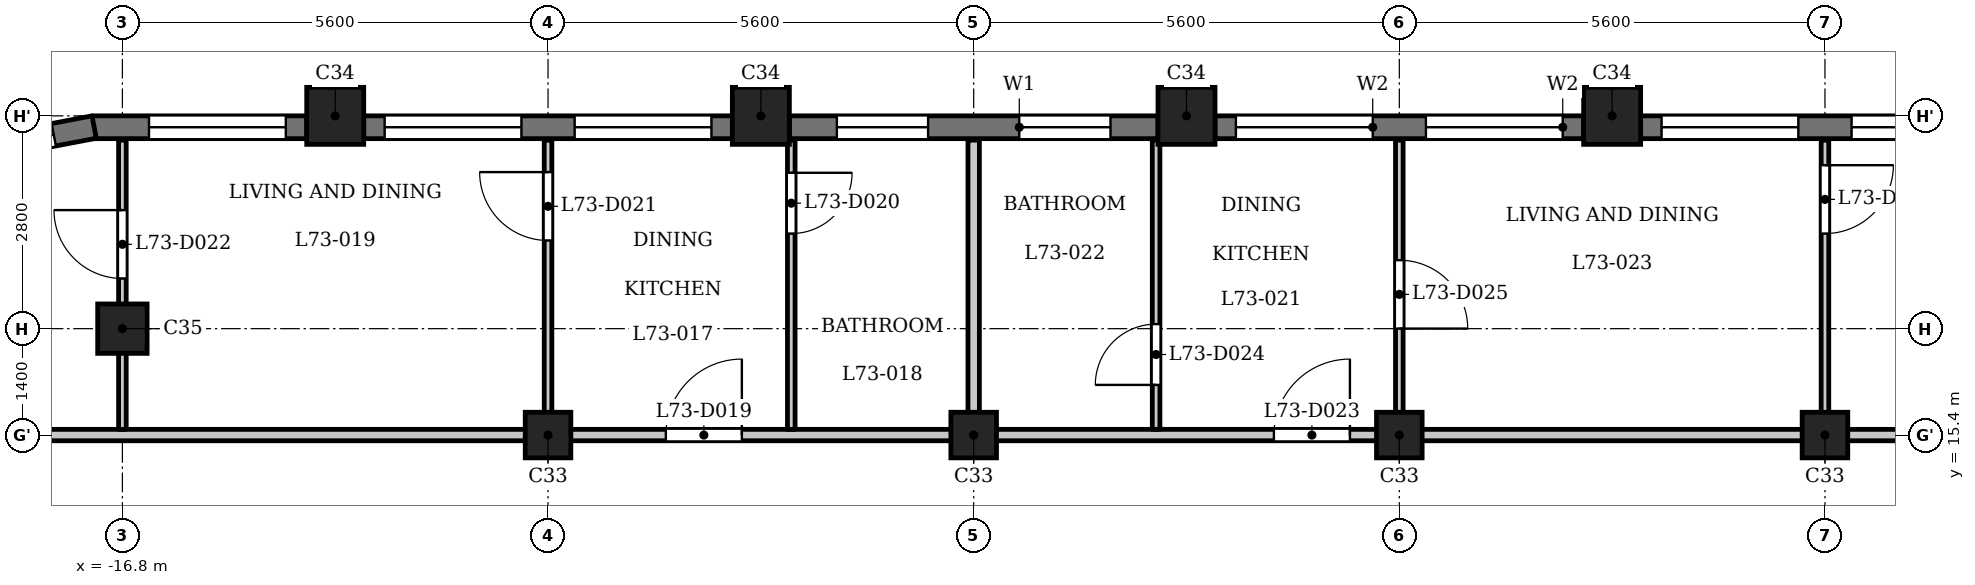
"""IFC4 building model, lengths in metres.
Left out: names, types, materials, properties, quantities, classifications, styles, units other than length and angle.
Written with IfcOpenShell. Run it as: python <this file> out.ifc"""

import sys

from ifc_helpers import new_model, si_unit, direction, frame, frame_2d, origin, origin_2d, place, context, subcontext, project, spatial, rectangle, extrude, element, fill, save


model = new_model("IFC4")
c1 = context("Model", 3, precision=1e-05, world=origin(), true_north=direction((0.0, 1.0)))
c2 = subcontext(c1, "Body", "Model", "MODEL_VIEW")
j1 = project(units=[si_unit("LENGTHUNIT", "METRE"), si_unit("PLANEANGLEUNIT", "RADIAN")], contexts=[c1])
p1 = place(None, origin())
s1 = spatial("IfcSite", under=j1, at=p1, CompositionType="ELEMENT")
p2 = place(p1, origin())
s2 = spatial("IfcBuilding", under=s1, at=p2, CompositionType="ELEMENT")
p3 = place(p2, frame((0.0, 0.0, 280.2)))
s3 = spatial("IfcBuildingStorey", under=s2, at=p3, CompositionType="ELEMENT", Elevation=280.2)
for number, where, z_axis, x_axis in (
    (1, (2.8, 19.6, 0.0), (0.0, 0.0, 1.0), (1.0, 0.0, 0.0)),
    (2, (-2.8, 19.6, 0.0), (0.0, 0.0, 1.0), (1.0, 0.0, 0.0)),
    (3, (-8.4, 19.6, 0.0), (0.0, 0.0, 1.0), (1.0, 0.0, 0.0)),
    (4, (-14.0, 19.6, 0.0), (0.0, 0.0, 1.0), (1.0, 0.0, 0.0)),
):
    element("IfcColumn", number, at=place(p3, frame(where, z_axis=z_axis, x_axis=x_axis)), inside=s3, PredefinedType="COLUMN", context=c2, shape_type="SweptSolid", body=[
        extrude(rectangle(XDim=0.75, YDim=0.75, at=origin_2d()), origin(), (0.0, 0.0, 1.0), 3.5),
    ])
p4 = place(p3, frame((-16.8, 16.8, 0.0), z_axis=(0.0, 0.0, 1.0), x_axis=(1.0, 0.0, 0.0)))
e5 = element("IfcColumn", 5, at=p4, inside=s3, PredefinedType="COLUMN", context=c2, shape_type="SweptSolid", body=[
    extrude(rectangle(XDim=0.65, YDim=0.65, at=origin_2d()), origin(), (0.0, 0.0, 1.0), 3.5),
])
for number, where, z_axis, x_axis in (
    (6, (-11.2, 15.4, 0.0), (0.0, 0.0, 1.0), (1.0, 0.0, 0.0)),
    (7, (-5.6, 15.4, 0.0), (0.0, 0.0, 1.0), (1.0, 0.0, 0.0)),
    (8, (0.0, 15.4, 0.0), (0.0, 0.0, 1.0), (1.0, 0.0, 0.0)),
    (9, (5.6, 15.4, 0.0), (0.0, 0.0, 1.0), (1.0, 0.0, 0.0)),
):
    element("IfcColumn", number, at=place(p3, frame(where, z_axis=z_axis, x_axis=x_axis)), inside=s3, PredefinedType="COLUMN", context=c2, shape_type="SweptSolid", body=[
        extrude(rectangle(XDim=0.6, YDim=0.6, at=origin_2d()), origin(), (0.0, 0.0, 1.0), 3.5),
    ])
p5 = place(p3, frame((8.025, 19.45, 0.0), z_axis=(0.0, 0.0, 1.0), x_axis=(-1.0, 0.0, 0.0)))
e10 = element("IfcWall", 10, at=p5, inside=s3, PredefinedType="SOLIDWALL", context=c2, shape_type="SweptSolid", body=[
    extrude(rectangle(XDim=4.85, YDim=0.3, at=frame_2d((2.425, 0.0))), origin(), (0.0, 0.0, 1.0), 2.5),
])
p6 = place(p5, frame((0.275, 0.0, 0.9)))
e11 = element("IfcOpeningElement", 11, at=p6, cuts=e10, PredefinedType="OPENING", context=c2, shape_type="SweptSolid", body=[
    extrude(rectangle(XDim=1.8, YDim=1.25, at=frame_2d((0.9, 0.625))), frame((0.0, 0.16, 0.0), z_axis=(0.0, -1.0, 0.0), x_axis=(1.0, 0.0, 0.0)), (0.0, 0.0, 1.0), 0.32),
])
p7 = place(p5, frame((2.775, 0.0, 0.9)))
e12 = element("IfcOpeningElement", 12, at=p7, cuts=e10, PredefinedType="OPENING", context=c2, shape_type="SweptSolid", body=[
    extrude(rectangle(XDim=1.8, YDim=1.25, at=frame_2d((0.9, 0.625))), frame((0.0, 0.16, 0.0), z_axis=(0.0, -1.0, 0.0), x_axis=(1.0, 0.0, 0.0)), (0.0, 0.0, 1.0), 0.32),
])
p8 = place(p3, frame((2.425, 19.45, 0.0), z_axis=(0.0, 0.0, 1.0), x_axis=(-1.0, 0.0, 0.0)))
e13 = element("IfcWall", 13, at=p8, inside=s3, PredefinedType="SOLIDWALL", context=c2, shape_type="SweptSolid", body=[
    extrude(rectangle(XDim=4.85, YDim=0.3, at=frame_2d((2.425, 0.0))), origin(), (0.0, 0.0, 1.0), 2.5),
])
p9 = place(p8, frame((0.275, 0.0, 0.9)))
e14 = element("IfcOpeningElement", 14, at=p9, cuts=e13, PredefinedType="OPENING", context=c2, shape_type="SweptSolid", body=[
    extrude(rectangle(XDim=1.8, YDim=1.25, at=frame_2d((0.9, 0.625))), frame((0.0, 0.16, 0.0), z_axis=(0.0, -1.0, 0.0), x_axis=(1.0, 0.0, 0.0)), (0.0, 0.0, 1.0), 0.32),
])
p10 = place(p8, frame((2.775, 0.0, 0.9)))
e15 = element("IfcOpeningElement", 15, at=p10, cuts=e13, PredefinedType="OPENING", context=c2, shape_type="SweptSolid", body=[
    extrude(rectangle(XDim=1.8, YDim=1.25, at=frame_2d((0.9, 0.625))), frame((0.0, 0.16, 0.0), z_axis=(0.0, -1.0, 0.0), x_axis=(1.0, 0.0, 0.0)), (0.0, 0.0, 1.0), 0.32),
])
p11 = place(p3, frame((-3.175, 19.45, 0.0), z_axis=(0.0, 0.0, 1.0), x_axis=(-1.0, 0.0, 0.0)))
e16 = element("IfcWall", 16, at=p11, inside=s3, PredefinedType="SOLIDWALL", context=c2, shape_type="SweptSolid", body=[
    extrude(rectangle(XDim=4.85, YDim=0.3, at=frame_2d((2.425, 0.0))), origin(), (0.0, 0.0, 1.0), 2.5),
])
p12 = place(p11, frame((0.625, 0.0, 0.6)))
e17 = element("IfcOpeningElement", 17, at=p12, cuts=e16, PredefinedType="OPENING", context=c2, shape_type="SweptSolid", body=[
    extrude(rectangle(XDim=1.2, YDim=1.55, at=frame_2d((0.6, 0.775))), frame((0.0, 0.16, 0.0), z_axis=(0.0, -1.0, 0.0), x_axis=(1.0, 0.0, 0.0)), (0.0, 0.0, 1.0), 0.32),
])
p13 = place(p11, frame((3.025, 0.0, 0.6)))
e18 = element("IfcOpeningElement", 18, at=p13, cuts=e16, PredefinedType="OPENING", context=c2, shape_type="SweptSolid", body=[
    extrude(rectangle(XDim=1.2, YDim=1.55, at=frame_2d((0.6, 0.775))), frame((0.0, 0.16, 0.0), z_axis=(0.0, -1.0, 0.0), x_axis=(1.0, 0.0, 0.0)), (0.0, 0.0, 1.0), 0.32),
])
p14 = place(p3, frame((-8.775, 19.45, 0.0), z_axis=(0.0, 0.0, 1.0), x_axis=(-1.0, 0.0, 0.0)))
e19 = element("IfcWall", 19, at=p14, inside=s3, PredefinedType="SOLIDWALL", context=c2, shape_type="SweptSolid", body=[
    extrude(rectangle(XDim=4.85, YDim=0.3, at=frame_2d((2.425, 0.0))), origin(), (0.0, 0.0, 1.0), 2.5),
])
p15 = place(p14, frame((0.275, 0.0, 0.9)))
e20 = element("IfcOpeningElement", 20, at=p15, cuts=e19, PredefinedType="OPENING", context=c2, shape_type="SweptSolid", body=[
    extrude(rectangle(XDim=1.8, YDim=1.25, at=frame_2d((0.9, 0.625))), frame((0.0, 0.16, 0.0), z_axis=(0.0, -1.0, 0.0), x_axis=(1.0, 0.0, 0.0)), (0.0, 0.0, 1.0), 0.32),
])
p16 = place(p14, frame((2.775, 0.0, 0.9)))
e21 = element("IfcOpeningElement", 21, at=p16, cuts=e19, PredefinedType="OPENING", context=c2, shape_type="SweptSolid", body=[
    extrude(rectangle(XDim=1.8, YDim=1.25, at=frame_2d((0.9, 0.625))), frame((0.0, 0.16, 0.0), z_axis=(0.0, -1.0, 0.0), x_axis=(1.0, 0.0, 0.0)), (0.0, 0.0, 1.0), 0.32),
])
p17 = place(p3, frame((-14.375, 19.45, 0.0), z_axis=(0.0, 0.0, 1.0), x_axis=(-1.0, 0.0, 0.0)))
e22 = element("IfcWall", 22, at=p17, inside=s3, PredefinedType="SOLIDWALL", context=c2, shape_type="SweptSolid", body=[
    extrude(rectangle(XDim=2.825, YDim=0.3, at=frame_2d((1.413, 0.0))), origin(), (0.0, 0.0, 1.0), 2.5),
])
p18 = place(p17, frame((0.275, 0.0, 0.9)))
e23 = element("IfcOpeningElement", 23, at=p18, cuts=e22, PredefinedType="OPENING", context=c2, shape_type="SweptSolid", body=[
    extrude(rectangle(XDim=1.8, YDim=1.25, at=frame_2d((0.9, 0.625))), frame((0.0, 0.16, 0.0), z_axis=(0.0, -1.0, 0.0), x_axis=(1.0, 0.0, 0.0)), (0.0, 0.0, 1.0), 0.32),
])
p19 = place(p3, frame((-17.172, 19.453, 0.0), z_axis=(0.0, 0.0, 1.0), x_axis=(-0.982284001233, -0.187398348234, 0.0)))
e24 = element("IfcWall", 24, at=p19, inside=s3, PredefinedType="SOLIDWALL", context=c2, shape_type="SweptSolid", body=[
    extrude(rectangle(XDim=1.881, YDim=0.3, at=frame_2d((0.941, 0.0))), origin(), (0.0, 0.0, 1.0), 2.5),
])
p20 = place(p19, frame((0.541, 0.0, 0.6)))
e25 = element("IfcOpeningElement", 25, at=p20, cuts=e24, PredefinedType="OPENING", context=c2, shape_type="SweptSolid", body=[
    extrude(rectangle(XDim=0.8, YDim=1.55, at=frame_2d((0.4, 0.775))), frame((0.0, 0.16, 0.0), z_axis=(0.0, -1.0, 0.0), x_axis=(1.0, 0.0, 0.0)), (0.0, 0.0, 1.0), 0.32),
])
p21 = place(p3, frame((-23.55, 15.4, 0.0), z_axis=(0.0, 0.0, 1.0), x_axis=(1.0, 0.0, 0.0)))
e26 = element("IfcWall", 26, at=p21, inside=s3, PredefinedType="PARTITIONING", context=c2, shape_type="SweptSolid", body=[
    extrude(rectangle(XDim=46.872, YDim=0.15, at=frame_2d((23.436, 0.0))), origin(), (0.0, 0.0, 1.0), 3.15),
])
p22 = place(p21, frame((13.9, 0.0, 0.0)))
e27 = element("IfcOpeningElement", 27, at=p22, cuts=e26, PredefinedType="OPENING", context=c2, shape_type="SweptSolid", body=[
    extrude(rectangle(XDim=1.0, YDim=2.1, at=frame_2d((0.5, 1.05))), frame((0.0, 0.085, 0.0), z_axis=(0.0, -1.0, 0.0), x_axis=(1.0, 0.0, 0.0)), (0.0, 0.0, 1.0), 0.17),
])
p23 = place(p21, frame((21.9, 0.0, 0.0)))
e28 = element("IfcOpeningElement", 28, at=p23, cuts=e26, PredefinedType="OPENING", context=c2, shape_type="SweptSolid", body=[
    extrude(rectangle(XDim=1.0, YDim=2.1, at=frame_2d((0.5, 1.05))), frame((0.0, 0.085, 0.0), z_axis=(0.0, -1.0, 0.0), x_axis=(1.0, 0.0, 0.0)), (0.0, 0.0, 1.0), 0.17),
])
p24 = place(p21, frame((38.7, 0.0, 0.0)))
e29 = element("IfcOpeningElement", 29, at=p24, cuts=e26, PredefinedType="OPENING", context=c2, shape_type="SweptSolid", body=[
    extrude(rectangle(XDim=1.0, YDim=2.1, at=frame_2d((0.5, 1.05))), frame((0.0, 0.085, 0.0), z_axis=(0.0, -1.0, 0.0), x_axis=(1.0, 0.0, 0.0)), (0.0, 0.0, 1.0), 0.17),
])
p25 = place(p3, frame((-16.8, 15.475, 0.0), z_axis=(0.0, 0.0, 1.0), x_axis=(0.0, 1.0, 0.0)))
e30 = element("IfcWall", 30, at=p25, inside=s3, PredefinedType="PARTITIONING", context=c2, shape_type="SweptSolid", body=[
    extrude(rectangle(XDim=3.805, YDim=0.1, at=frame_2d((1.902, 0.0))), origin(), (0.0, 0.0, 1.0), 3.15),
])
p26 = place(p25, frame((1.985, 0.0, 0.0)))
e31 = element("IfcOpeningElement", 31, at=p26, cuts=e30, PredefinedType="OPENING", context=c2, shape_type="SweptSolid", body=[
    extrude(rectangle(XDim=0.9, YDim=2.1, at=frame_2d((0.45, 1.05))), frame((0.0, 0.06, 0.0), z_axis=(0.0, -1.0, 0.0), x_axis=(1.0, 0.0, 0.0)), (0.0, 0.0, 1.0), 0.12),
])
p27 = place(p3, frame((-11.2, 15.475, 0.0), z_axis=(0.0, 0.0, 1.0), x_axis=(0.0, 1.0, 0.0)))
e32 = element("IfcWall", 32, at=p27, inside=s3, PredefinedType="PARTITIONING", context=c2, shape_type="SweptSolid", body=[
    extrude(rectangle(XDim=3.805, YDim=0.1, at=frame_2d((1.902, 0.0))), origin(), (0.0, 0.0, 1.0), 3.15),
])
p28 = place(p27, frame((2.485, 0.0, 0.0)))
e33 = element("IfcOpeningElement", 33, at=p28, cuts=e32, PredefinedType="OPENING", context=c2, shape_type="SweptSolid", body=[
    extrude(rectangle(XDim=0.9, YDim=2.1, at=frame_2d((0.45, 1.05))), frame((0.0, 0.06, 0.0), z_axis=(0.0, -1.0, 0.0), x_axis=(1.0, 0.0, 0.0)), (0.0, 0.0, 1.0), 0.12),
])
p29 = place(p3, frame((-8.0, 15.475, 0.0), z_axis=(0.0, 0.0, 1.0), x_axis=(0.0, 1.0, 0.0)))
e34 = element("IfcWall", 34, at=p29, inside=s3, PredefinedType="PARTITIONING", context=c2, shape_type="SweptSolid", body=[
    extrude(rectangle(XDim=3.805, YDim=0.1, at=frame_2d((1.902, 0.0))), origin(), (0.0, 0.0, 1.0), 3.15),
])
p30 = place(p29, frame((2.576, 0.0, 0.0)))
e35 = element("IfcOpeningElement", 35, at=p30, cuts=e34, PredefinedType="OPENING", context=c2, shape_type="SweptSolid", body=[
    extrude(rectangle(XDim=0.8, YDim=2.1, at=frame_2d((0.4, 1.05))), frame((0.0, 0.06, 0.0), z_axis=(0.0, -1.0, 0.0), x_axis=(1.0, 0.0, 0.0)), (0.0, 0.0, 1.0), 0.12),
])
p31 = place(p3, frame((-5.6, 15.475, 0.0), z_axis=(0.0, 0.0, 1.0), x_axis=(0.0, 1.0, 0.0)))
e36 = element("IfcWall", 36, at=p31, inside=s3, PredefinedType="PARTITIONING", context=c2, shape_type="SweptSolid", body=[
    extrude(rectangle(XDim=3.805, YDim=0.15, at=frame_2d((1.902, 0.0))), origin(), (0.0, 0.0, 1.0), 3.15),
])
p32 = place(p3, frame((-3.2, 15.475, 0.0), z_axis=(0.0, 0.0, 1.0), x_axis=(0.0, 1.0, 0.0)))
e37 = element("IfcWall", 37, at=p32, inside=s3, PredefinedType="PARTITIONING", context=c2, shape_type="SweptSolid", body=[
    extrude(rectangle(XDim=3.805, YDim=0.1, at=frame_2d((1.902, 0.0))), origin(), (0.0, 0.0, 1.0), 3.15),
])
p33 = place(p32, frame((0.585, 0.0, 0.0)))
e38 = element("IfcOpeningElement", 38, at=p33, cuts=e37, PredefinedType="OPENING", context=c2, shape_type="SweptSolid", body=[
    extrude(rectangle(XDim=0.8, YDim=2.1, at=frame_2d((0.4, 1.05))), frame((0.0, 0.06, 0.0), z_axis=(0.0, -1.0, 0.0), x_axis=(1.0, 0.0, 0.0)), (0.0, 0.0, 1.0), 0.12),
])
p34 = place(p3, frame((0.0, 15.475, 0.0), z_axis=(0.0, 0.0, 1.0), x_axis=(0.0, 1.0, 0.0)))
e39 = element("IfcWall", 39, at=p34, inside=s3, PredefinedType="PARTITIONING", context=c2, shape_type="SweptSolid", body=[
    extrude(rectangle(XDim=3.805, YDim=0.1, at=frame_2d((1.902, 0.0))), origin(), (0.0, 0.0, 1.0), 3.15),
])
p35 = place(p34, frame((1.326, 0.0, 0.0)))
e40 = element("IfcOpeningElement", 40, at=p35, cuts=e39, PredefinedType="OPENING", context=c2, shape_type="SweptSolid", body=[
    extrude(rectangle(XDim=0.9, YDim=2.1, at=frame_2d((0.45, 1.05))), frame((0.0, 0.06, 0.0), z_axis=(0.0, -1.0, 0.0), x_axis=(1.0, 0.0, 0.0)), (0.0, 0.0, 1.0), 0.12),
])
p36 = place(p3, frame((5.6, 15.475, 0.0), z_axis=(0.0, 0.0, 1.0), x_axis=(0.0, 1.0, 0.0)))
e41 = element("IfcWall", 41, at=p36, inside=s3, PredefinedType="PARTITIONING", context=c2, shape_type="SweptSolid", body=[
    extrude(rectangle(XDim=3.805, YDim=0.1, at=frame_2d((1.902, 0.0))), origin(), (0.0, 0.0, 1.0), 3.15),
])
p37 = place(p36, frame((2.576, 0.0, 0.0)))
e42 = element("IfcOpeningElement", 42, at=p37, cuts=e41, PredefinedType="OPENING", context=c2, shape_type="SweptSolid", body=[
    extrude(rectangle(XDim=0.9, YDim=2.1, at=frame_2d((0.45, 1.05))), frame((0.0, 0.06, 0.0), z_axis=(0.0, -1.0, 0.0), x_axis=(1.0, 0.0, 0.0)), (0.0, 0.0, 1.0), 0.12),
])
p38 = place(p22, origin())
e43 = element("IfcDoor", 43, at=p38, inside=s3, OperationType="SINGLE_SWING_LEFT", PredefinedType="DOOR", context=c2, shape_type="SweptSolid", body=[
    extrude(rectangle(XDim=1.0, YDim=2.1, at=frame_2d((0.5, 1.05))), frame((0.0, 0.025, 0.0), z_axis=(0.0, -1.0, 0.0), x_axis=(1.0, 0.0, 0.0)), (0.0, 0.0, 1.0), 0.05),
])
fill(e27, e43)
p39 = place(p30, origin())
e44 = element("IfcDoor", 44, at=p39, inside=s3, OperationType="SINGLE_SWING_RIGHT", PredefinedType="DOOR", context=c2, shape_type="SweptSolid", body=[
    extrude(rectangle(XDim=0.8, YDim=2.1, at=frame_2d((0.4, 1.05))), frame((0.0, 0.025, 0.0), z_axis=(0.0, -1.0, 0.0), x_axis=(1.0, 0.0, 0.0)), (0.0, 0.0, 1.0), 0.05),
])
fill(e35, e44)
p40 = place(p28, origin())
e45 = element("IfcDoor", 45, at=p40, inside=s3, OperationType="SINGLE_SWING_LEFT", PredefinedType="DOOR", context=c2, shape_type="SweptSolid", body=[
    extrude(rectangle(XDim=0.9, YDim=2.1, at=frame_2d((0.45, 1.05))), frame((0.0, 0.025, 0.0), z_axis=(0.0, -1.0, 0.0), x_axis=(1.0, 0.0, 0.0)), (0.0, 0.0, 1.0), 0.05),
])
fill(e33, e45)
p41 = place(p26, origin())
e46 = element("IfcDoor", 46, at=p41, inside=s3, OperationType="SINGLE_SWING_LEFT", PredefinedType="DOOR", context=c2, shape_type="SweptSolid", body=[
    extrude(rectangle(XDim=0.9, YDim=2.1, at=frame_2d((0.45, 1.05))), frame((0.0, 0.025, 0.0), z_axis=(0.0, -1.0, 0.0), x_axis=(1.0, 0.0, 0.0)), (0.0, 0.0, 1.0), 0.05),
])
fill(e31, e46)
p42 = place(p23, origin())
e47 = element("IfcDoor", 47, at=p42, inside=s3, OperationType="SINGLE_SWING_LEFT", PredefinedType="DOOR", context=c2, shape_type="SweptSolid", body=[
    extrude(rectangle(XDim=1.0, YDim=2.1, at=frame_2d((0.5, 1.05))), frame((0.0, 0.025, 0.0), z_axis=(0.0, -1.0, 0.0), x_axis=(1.0, 0.0, 0.0)), (0.0, 0.0, 1.0), 0.05),
])
fill(e28, e47)
p43 = place(p33, origin())
e48 = element("IfcDoor", 48, at=p43, inside=s3, OperationType="SINGLE_SWING_RIGHT", PredefinedType="DOOR", context=c2, shape_type="SweptSolid", body=[
    extrude(rectangle(XDim=0.8, YDim=2.1, at=frame_2d((0.4, 1.05))), frame((0.0, 0.025, 0.0), z_axis=(0.0, -1.0, 0.0), x_axis=(1.0, 0.0, 0.0)), (0.0, 0.0, 1.0), 0.05),
])
fill(e38, e48)
p44 = place(p35, origin())
e49 = element("IfcDoor", 49, at=p44, inside=s3, OperationType="SINGLE_SWING_LEFT", PredefinedType="DOOR", context=c2, shape_type="SweptSolid", body=[
    extrude(rectangle(XDim=0.9, YDim=2.1, at=frame_2d((0.45, 1.05))), frame((0.0, 0.025, 0.0), z_axis=(0.0, -1.0, 0.0), x_axis=(1.0, 0.0, 0.0)), (0.0, 0.0, 1.0), 0.05),
])
fill(e40, e49)
p45 = place(p37, origin())
e50 = element("IfcDoor", 50, at=p45, inside=s3, OperationType="SINGLE_SWING_RIGHT", PredefinedType="DOOR", context=c2, shape_type="SweptSolid", body=[
    extrude(rectangle(XDim=0.9, YDim=2.1, at=frame_2d((0.45, 1.05))), frame((0.0, 0.025, 0.0), z_axis=(0.0, -1.0, 0.0), x_axis=(1.0, 0.0, 0.0)), (0.0, 0.0, 1.0), 0.05),
])
fill(e42, e50)
p46 = place(p6, origin())
e51 = element("IfcWindow", 51, at=p46, inside=s3, PartitioningType="SINGLE_PANEL", PredefinedType="WINDOW", context=c2, shape_type="SweptSolid", body=[
    extrude(rectangle(XDim=1.8, YDim=1.25, at=frame_2d((0.9, 0.625))), frame((0.0, 0.03, 0.0), z_axis=(0.0, -1.0, 0.0), x_axis=(1.0, 0.0, 0.0)), (0.0, 0.0, 1.0), 0.06),
])
fill(e11, e51)
p47 = place(p7, origin())
e52 = element("IfcWindow", 52, at=p47, inside=s3, PartitioningType="SINGLE_PANEL", PredefinedType="WINDOW", context=c2, shape_type="SweptSolid", body=[
    extrude(rectangle(XDim=1.8, YDim=1.25, at=frame_2d((0.9, 0.625))), frame((0.0, 0.03, 0.0), z_axis=(0.0, -1.0, 0.0), x_axis=(1.0, 0.0, 0.0)), (0.0, 0.0, 1.0), 0.06),
])
fill(e12, e52)
p48 = place(p9, origin())
e53 = element("IfcWindow", 53, at=p48, inside=s3, PartitioningType="SINGLE_PANEL", PredefinedType="WINDOW", context=c2, shape_type="SweptSolid", body=[
    extrude(rectangle(XDim=1.8, YDim=1.25, at=frame_2d((0.9, 0.625))), frame((0.0, 0.03, 0.0), z_axis=(0.0, -1.0, 0.0), x_axis=(1.0, 0.0, 0.0)), (0.0, 0.0, 1.0), 0.06),
])
fill(e14, e53)
p49 = place(p10, origin())
e54 = element("IfcWindow", 54, at=p49, inside=s3, PartitioningType="SINGLE_PANEL", PredefinedType="WINDOW", context=c2, shape_type="SweptSolid", body=[
    extrude(rectangle(XDim=1.8, YDim=1.25, at=frame_2d((0.9, 0.625))), frame((0.0, 0.03, 0.0), z_axis=(0.0, -1.0, 0.0), x_axis=(1.0, 0.0, 0.0)), (0.0, 0.0, 1.0), 0.06),
])
fill(e15, e54)
p50 = place(p12, origin())
e55 = element("IfcWindow", 55, at=p50, inside=s3, PartitioningType="SINGLE_PANEL", PredefinedType="WINDOW", context=c2, shape_type="SweptSolid", body=[
    extrude(rectangle(XDim=1.2, YDim=1.55, at=frame_2d((0.6, 0.775))), frame((0.0, 0.03, 0.0), z_axis=(0.0, -1.0, 0.0), x_axis=(1.0, 0.0, 0.0)), (0.0, 0.0, 1.0), 0.06),
])
fill(e17, e55)
p51 = place(p13, origin())
e56 = element("IfcWindow", 56, at=p51, inside=s3, PartitioningType="SINGLE_PANEL", PredefinedType="WINDOW", context=c2, shape_type="SweptSolid", body=[
    extrude(rectangle(XDim=1.2, YDim=1.55, at=frame_2d((0.6, 0.775))), frame((0.0, 0.03, 0.0), z_axis=(0.0, -1.0, 0.0), x_axis=(1.0, 0.0, 0.0)), (0.0, 0.0, 1.0), 0.06),
])
fill(e18, e56)
p52 = place(p15, origin())
e57 = element("IfcWindow", 57, at=p52, inside=s3, PartitioningType="SINGLE_PANEL", PredefinedType="WINDOW", context=c2, shape_type="SweptSolid", body=[
    extrude(rectangle(XDim=1.8, YDim=1.25, at=frame_2d((0.9, 0.625))), frame((0.0, 0.03, 0.0), z_axis=(0.0, -1.0, 0.0), x_axis=(1.0, 0.0, 0.0)), (0.0, 0.0, 1.0), 0.06),
])
fill(e20, e57)
p53 = place(p16, origin())
e58 = element("IfcWindow", 58, at=p53, inside=s3, PartitioningType="SINGLE_PANEL", PredefinedType="WINDOW", context=c2, shape_type="SweptSolid", body=[
    extrude(rectangle(XDim=1.8, YDim=1.25, at=frame_2d((0.9, 0.625))), frame((0.0, 0.03, 0.0), z_axis=(0.0, -1.0, 0.0), x_axis=(1.0, 0.0, 0.0)), (0.0, 0.0, 1.0), 0.06),
])
fill(e21, e58)
p54 = place(p18, origin())
e59 = element("IfcWindow", 59, at=p54, inside=s3, PartitioningType="SINGLE_PANEL", PredefinedType="WINDOW", context=c2, shape_type="SweptSolid", body=[
    extrude(rectangle(XDim=1.8, YDim=1.25, at=frame_2d((0.9, 0.625))), frame((0.0, 0.03, 0.0), z_axis=(0.0, -1.0, 0.0), x_axis=(1.0, 0.0, 0.0)), (0.0, 0.0, 1.0), 0.06),
])
fill(e23, e59)
p55 = place(p20, origin())
e60 = element("IfcWindow", 60, at=p55, inside=s3, PartitioningType="SINGLE_PANEL", PredefinedType="WINDOW", context=c2, shape_type="SweptSolid", body=[
    extrude(rectangle(XDim=0.8, YDim=1.55, at=frame_2d((0.4, 0.775))), frame((0.0, 0.03, 0.0), z_axis=(0.0, -1.0, 0.0), x_axis=(1.0, 0.0, 0.0)), (0.0, 0.0, 1.0), 0.06),
])
fill(e25, e60)
save(model, sys.argv[1])
